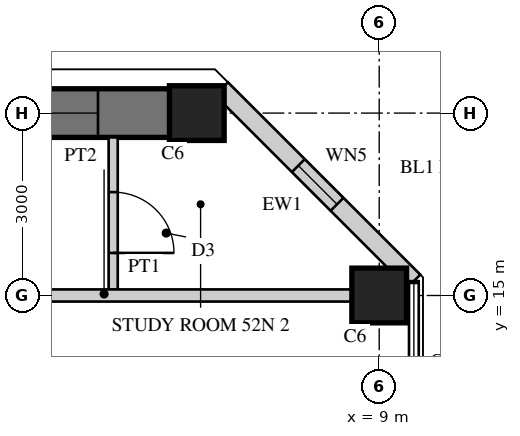
"""IFC4 building model, lengths in metres.
Left out: names, types, materials, properties, quantities, classifications, styles, units other than length and angle.
Written with IfcOpenShell. Run it as: python <this file> out.ifc"""

import sys

from ifc_helpers import new_model, si_unit, direction, frame, frame_2d, origin, origin_2d, place, context, subcontext, project, spatial, rectangle, hollow_rectangle, extrude, element, fill, save


model = new_model("IFC4")
c1 = context("Model", 3, precision=1e-05, world=origin(), true_north=direction((0.0, 1.0)))
c2 = subcontext(c1, "Body", "Model", "MODEL_VIEW")
j1 = project(units=[si_unit("LENGTHUNIT", "METRE"), si_unit("PLANEANGLEUNIT", "RADIAN")], contexts=[c1])
p1 = place(None, origin())
s1 = spatial("IfcSite", under=j1, at=p1, CompositionType="ELEMENT")
p2 = place(p1, origin())
s2 = spatial("IfcBuilding", under=s1, at=p2, CompositionType="ELEMENT")
p3 = place(p2, frame((0.0, 0.0, 206.9)))
s3 = spatial("IfcBuildingStorey", under=s2, at=p3, CompositionType="ELEMENT", Elevation=206.9)
p4 = place(p3, frame((6.0, 18.0, 0.0), z_axis=(0.0, 0.0, 1.0), x_axis=(-1.0, 0.0, 0.0)))
e1 = element("IfcWall", 1, at=p4, inside=s3, PredefinedType="SHEAR", context=c2, shape_type="SweptSolid", body=[
    extrude(rectangle(XDim=12.0, YDim=0.8, at=frame_2d((6.0, 0.0))), origin(), (0.0, 0.0, 1.0), 3.4),
])
p5 = place(p4, frame((1.625, 0.0, 0.6)))
e2 = element("IfcOpeningElement", 2, at=p5, cuts=e1, PredefinedType="OPENING", context=c2, shape_type="SweptSolid", body=[
    extrude(rectangle(XDim=3.0, YDim=2.4, at=frame_2d((1.5, 1.2))), frame((0.0, 0.41, 0.0), z_axis=(0.0, -1.0, 0.0), x_axis=(1.0, 0.0, 0.0)), (0.0, 0.0, 1.0), 0.82),
])
p6 = place(p4, frame((7.375, 0.0, 0.6)))
e3 = element("IfcOpeningElement", 3, at=p6, cuts=e1, PredefinedType="OPENING", context=c2, shape_type="SweptSolid", body=[
    extrude(rectangle(XDim=3.0, YDim=2.4, at=frame_2d((1.5, 1.2))), frame((0.0, 0.41, 0.0), z_axis=(0.0, -1.0, 0.0), x_axis=(1.0, 0.0, 0.0)), (0.0, 0.0, 1.0), 0.82),
])
for number, where, z_axis, x_axis in (
    (4, (9.0, 15.0, 0.0), (0.0, 0.0, 1.0), (1.0, 0.0, 0.0)),
    (5, (6.0, 18.0, 0.0), (0.0, 0.0, 1.0), (1.0, 0.0, 0.0)),
):
    element("IfcColumn", number, at=place(p3, frame(where, z_axis=z_axis, x_axis=x_axis)), inside=s3, PredefinedType="COLUMN", context=c2, shape_type="SweptSolid", body=[
        extrude(rectangle(XDim=0.9, YDim=0.9, at=origin_2d()), origin(), (0.0, 0.0, 1.0), 3.4),
    ])
p7 = place(p3, frame((9.57, 15.236, 0.0), z_axis=(0.0, 0.0, 1.0), x_axis=(-0.707134062067, 0.707079499254, 0.0)))
e6 = element("IfcWall", 6, at=p7, inside=s3, PredefinedType="SOLIDWALL", context=c2, shape_type="SweptSolid", body=[
    extrude(rectangle(XDim=4.475, YDim=0.3, at=frame_2d((2.237, 0.0))), origin(), (0.0, 0.0, 1.0), 3.22),
])
p8 = place(p7, frame((1.787, 0.0, 0.3)))
e7 = element("IfcOpeningElement", 7, at=p8, cuts=e6, PredefinedType="OPENING", context=c2, shape_type="SweptSolid", body=[
    extrude(rectangle(XDim=0.9, YDim=2.4, at=frame_2d((0.45, 1.2))), frame((0.0, 0.16, 0.0), z_axis=(0.0, -1.0, 0.0), x_axis=(1.0, 0.0, 0.0)), (0.0, 0.0, 1.0), 0.32),
])
p9 = place(p3, frame((4.625, 15.1, 0.0), z_axis=(0.0, 0.0, 1.0), x_axis=(0.0, 1.0, 0.0)))
e8 = element("IfcWall", 8, at=p9, inside=s3, PredefinedType="PARTITIONING", context=c2, shape_type="SweptSolid", body=[
    extrude(rectangle(XDim=2.5, YDim=0.15, at=frame_2d((1.25, 0.0))), origin(), (0.0, 0.0, 1.0), 3.22),
])
p10 = place(p9, frame((0.6, 0.0, 0.0)))
e9 = element("IfcOpeningElement", 9, at=p10, cuts=e8, PredefinedType="OPENING", context=c2, shape_type="SweptSolid", body=[
    extrude(rectangle(XDim=1.0, YDim=2.1, at=frame_2d((0.5, 1.05))), frame((0.0, 0.085, 0.0), z_axis=(0.0, -1.0, 0.0), x_axis=(1.0, 0.0, 0.0)), (0.0, 0.0, 1.0), 0.17),
])
p11 = place(p3, frame((8.55, 15.0, 0.0), z_axis=(0.0, 0.0, 1.0), x_axis=(-1.0, 0.0, 0.0)))
e10 = element("IfcWall", 10, at=p11, inside=s3, PredefinedType="SOLIDWALL", context=c2, shape_type="SweptSolid", body=[
    extrude(rectangle(XDim=8.15, YDim=0.2, at=frame_2d((4.075, 0.0))), origin(), (0.0, 0.0, 1.0), 2.47),
])
p12 = place(p8, origin())
e11 = element("IfcWindow", 11, at=p12, inside=s3, PartitioningType="SINGLE_PANEL", PredefinedType="WINDOW", context=c2, shape_type="SweptSolid", body=[
    extrude(hollow_rectangle(XDim=0.9, YDim=2.4, WallThickness=0.06, at=frame_2d((0.45, 1.2))), frame((0.0, 0.03, 0.0), z_axis=(0.0, -1.0, 0.0), x_axis=(1.0, 0.0, 0.0)), (0.0, 0.0, 1.0), 0.06),
    extrude(rectangle(XDim=0.779, YDim=2.279, at=frame_2d((0.45, 1.2))), frame((0.0, 0.03, 0.0), z_axis=(0.0, -1.0, 0.0), x_axis=(1.0, 0.0, 0.0)), (0.0, 0.0, 1.0), 0.06),
])
fill(e7, e11)
p13 = place(p5, origin())
e12 = element("IfcWindow", 12, at=p13, inside=s3, PartitioningType="SINGLE_PANEL", PredefinedType="WINDOW", context=c2, shape_type="SweptSolid", body=[
    extrude(hollow_rectangle(XDim=3.0, YDim=2.4, WallThickness=0.06, at=frame_2d((1.5, 1.2))), frame((0.0, 0.03, 0.0), z_axis=(0.0, -1.0, 0.0), x_axis=(1.0, 0.0, 0.0)), (0.0, 0.0, 1.0), 0.06),
    extrude(rectangle(XDim=2.879, YDim=2.279, at=frame_2d((1.5, 1.2))), frame((0.0, 0.03, 0.0), z_axis=(0.0, -1.0, 0.0), x_axis=(1.0, 0.0, 0.0)), (0.0, 0.0, 1.0), 0.06),
])
fill(e2, e12)
p14 = place(p10, frame((1.0, 0.0, 0.0), z_axis=(0.0, 0.0, 1.0), x_axis=(-1.0, 0.0, 0.0)))
e13 = element("IfcDoor", 13, at=p14, inside=s3, OperationType="SINGLE_SWING_RIGHT", PredefinedType="DOOR", context=c2, shape_type="SweptSolid", body=[
    extrude(rectangle(XDim=1.0, YDim=2.1, at=frame_2d((0.5, 1.05))), frame((0.0, 0.025, 0.0), z_axis=(0.0, -1.0, 0.0), x_axis=(1.0, 0.0, 0.0)), (0.0, 0.0, 1.0), 0.05),
])
fill(e9, e13)
save(model, sys.argv[1])
